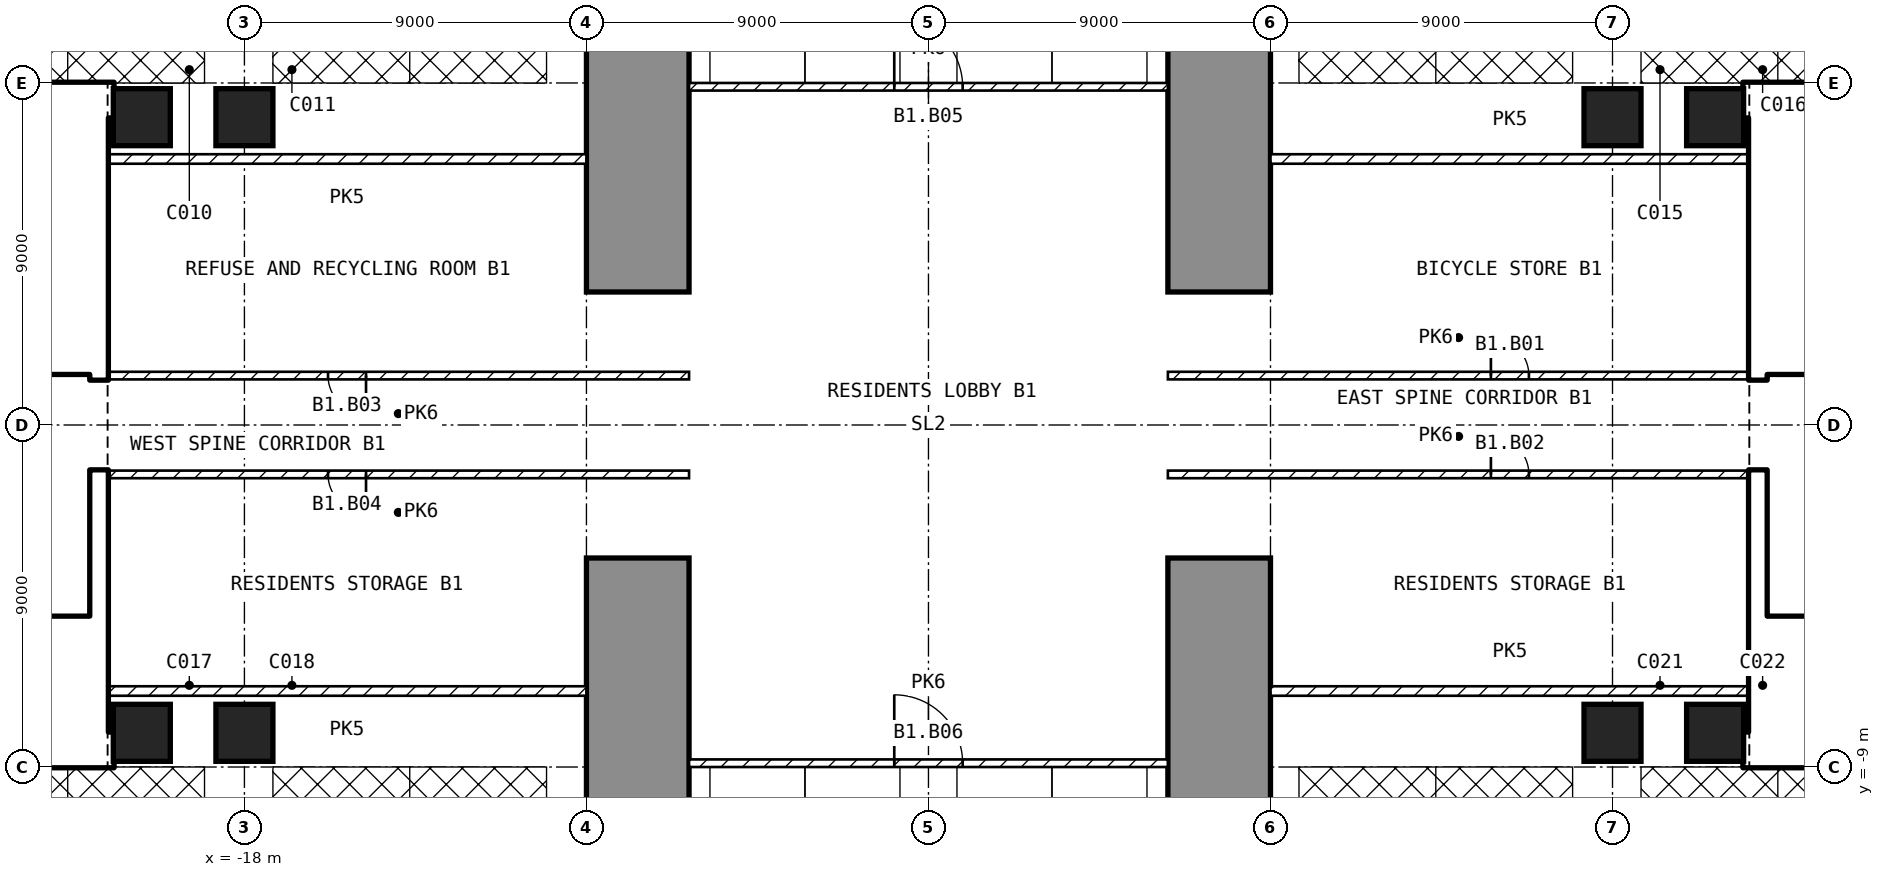
"""IFC4 building model, lengths in metres.
Left out: names, types, materials, properties, quantities, classifications, styles, units other than length and angle.
Written with IfcOpenShell. Run it as: python <this file> out.ifc"""

import sys

from ifc_helpers import new_model, si_unit, direction, frame, frame_2d, origin, origin_2d, place, context, subcontext, project, spatial, polyline, rectangle, outline, extrude, element, fill, save


model = new_model("IFC4")
c1 = context("Model", 3, precision=1e-05, world=origin(), true_north=direction((0.0, 1.0)))
c2 = subcontext(c1, "Body", "Model", "MODEL_VIEW")
j1 = project(units=[si_unit("LENGTHUNIT", "METRE"), si_unit("PLANEANGLEUNIT", "RADIAN")], contexts=[c1])
p1 = place(None, origin())
s1 = spatial("IfcSite", under=j1, at=p1, CompositionType="ELEMENT")
p2 = place(p1, origin())
s2 = spatial("IfcBuilding", under=s1, at=p2, CompositionType="ELEMENT")
p3 = place(p2, frame((0.0, 0.0, -4.5)))
s3 = spatial("IfcBuildingStorey", under=s2, at=p3, CompositionType="ELEMENT", Elevation=-4.5)
for number, where, z_axis, x_axis in (
    (1, (-20.7, -8.1, -0.3), (0.0, 0.0, 1.0), (1.0, 0.0, 0.0)),
    (2, (-20.7, 8.1, -0.3), (0.0, 0.0, 1.0), (1.0, 0.0, 0.0)),
    (3, (-18.0, -8.1, -0.3), (0.0, 0.0, 1.0), (1.0, 0.0, 0.0)),
    (4, (-18.0, 8.1, -0.3), (0.0, 0.0, 1.0), (1.0, 0.0, 0.0)),
    (5, (18.0, -8.1, -0.3), (0.0, 0.0, 1.0), (1.0, 0.0, 0.0)),
    (6, (18.0, 8.1, -0.3), (0.0, 0.0, 1.0), (1.0, 0.0, 0.0)),
    (7, (20.7, -8.1, -0.3), (0.0, 0.0, 1.0), (1.0, 0.0, 0.0)),
    (8, (20.7, 8.1, -0.3), (0.0, 0.0, 1.0), (1.0, 0.0, 0.0)),
):
    element("IfcColumn", number, at=place(p3, frame(where, z_axis=z_axis, x_axis=x_axis)), inside=s3, PredefinedType="COLUMN", context=c2, shape_type="SweptSolid", body=[
        extrude(rectangle(XDim=1.5, YDim=1.5, at=origin_2d()), origin(), (0.0, 0.0, 1.0), 4.4),
    ])
p4 = place(p3, frame((6.3, -27.0, -0.3), z_axis=(1.0, 0.0, 0.0), x_axis=(0.0, 1.0, 0.0)))
e9 = element("IfcWall", 9, at=p4, inside=s3, PredefinedType="SOLIDWALL", context=c2, shape_type="SweptSolid", body=[
    extrude(outline(polyline([(0.0, 0.0), (5.5, 0.0), (5.5, 3.3), (12.5, 3.3), (12.5, 0.0), (23.5, 0.0), (23.5, 4.4), (0.0, 4.4), (0.0, 0.0)])), origin(), (0.0, 0.0, 1.0), 2.7),
])
p5 = place(p3, frame((6.3, 3.5, -0.3), z_axis=(1.0, 0.0, 0.0), x_axis=(0.0, 1.0, 0.0)))
e10 = element("IfcWall", 10, at=p5, inside=s3, PredefinedType="SOLIDWALL", context=c2, shape_type="SweptSolid", body=[
    extrude(outline(polyline([(0.0, 0.0), (11.0, 0.0), (11.0, 3.3), (18.0, 3.3), (18.0, 0.0), (23.5, 0.0), (23.5, 4.4), (0.0, 4.4), (0.0, 0.0)])), origin(), (0.0, 0.0, 1.0), 2.7),
])
p6 = place(p3, frame((-9.0, -27.0, -0.3), z_axis=(1.0, 0.0, 0.0), x_axis=(0.0, 1.0, 0.0)))
e11 = element("IfcWall", 11, at=p6, inside=s3, PredefinedType="SOLIDWALL", context=c2, shape_type="SweptSolid", body=[
    extrude(outline(polyline([(0.0, 0.0), (5.5, 0.0), (5.5, 3.3), (12.5, 3.3), (12.5, 0.0), (23.5, 0.0), (23.5, 4.4), (0.0, 4.4), (0.0, 0.0)])), origin(), (0.0, 0.0, 1.0), 2.7),
])
p7 = place(p3, frame((-9.0, 3.5, -0.3), z_axis=(1.0, 0.0, 0.0), x_axis=(0.0, 1.0, 0.0)))
e12 = element("IfcWall", 12, at=p7, inside=s3, PredefinedType="SOLIDWALL", context=c2, shape_type="SweptSolid", body=[
    extrude(outline(polyline([(0.0, 0.0), (11.0, 0.0), (11.0, 3.3), (18.0, 3.3), (18.0, 0.0), (23.5, 0.0), (23.5, 4.4), (0.0, 4.4), (0.0, 0.0)])), origin(), (0.0, 0.0, 1.0), 2.7),
])
p8 = place(p3, frame((21.45, -8.55, 0.0), z_axis=(0.0, 0.0, 1.0), x_axis=(1.0, 0.0, 0.0)))
e13 = element("IfcWall", 13, at=p8, inside=s3, PredefinedType="SHEAR", context=c2, shape_type="SweptSolid", body=[
    extrude(rectangle(XDim=10.95, YDim=0.9, at=frame_2d((5.475, 0.0))), origin(), (0.0, 0.0, 1.0), 4.1),
])
p9 = place(p3, frame((21.45, 8.55, 0.0), z_axis=(0.0, 0.0, 1.0), x_axis=(1.0, 0.0, 0.0)))
e14 = element("IfcWall", 14, at=p9, inside=s3, PredefinedType="SHEAR", context=c2, shape_type="SweptSolid", body=[
    extrude(rectangle(XDim=10.05, YDim=0.9, at=frame_2d((5.025, 0.0))), origin(), (0.0, 0.0, 1.0), 4.1),
])
for number, where, z_axis, x_axis in (
    (15, (21.825, -8.1, 0.0), (0.0, 0.0, 1.0), (0.0, 1.0, 0.0)),
    (16, (21.825, 1.2, 0.0), (0.0, 0.0, 1.0), (0.0, 1.0, 0.0)),
):
    element("IfcWall", number, at=place(p3, frame(where, z_axis=z_axis, x_axis=x_axis)), inside=s3, PredefinedType="SHEAR", context=c2, shape_type="SweptSolid", body=[
        extrude(rectangle(XDim=6.9, YDim=0.45, at=frame_2d((3.45, 0.0))), origin(), (0.0, 0.0, 1.0), 4.1),
    ])
p10 = place(p3, frame((22.05, 1.45, 0.0), z_axis=(0.0, 0.0, 1.0), x_axis=(1.0, 0.0, 0.0)))
e17 = element("IfcWall", 17, at=p10, inside=s3, PredefinedType="SOLIDWALL", context=c2, shape_type="SweptSolid", body=[
    extrude(rectangle(XDim=13.05, YDim=0.2, at=frame_2d((6.525, 0.0))), origin(), (0.0, 0.0, 1.0), 4.1),
])
p11 = place(p10, frame((0.75, 0.0, 0.0)))
e18 = element("IfcOpeningElement", 18, at=p11, cuts=e17, PredefinedType="OPENING", context=c2, shape_type="SweptSolid", body=[
    extrude(rectangle(XDim=1.0, YDim=2.1, at=frame_2d((0.5, 1.05))), frame((0.0, 0.11, 0.0), z_axis=(0.0, -1.0, 0.0), x_axis=(1.0, 0.0, 0.0)), (0.0, 0.0, 1.0), 0.22),
])
p12 = place(p10, frame((3.25, 0.0, 0.0)))
e19 = element("IfcOpeningElement", 19, at=p12, cuts=e17, PredefinedType="OPENING", context=c2, shape_type="SweptSolid", body=[
    extrude(rectangle(XDim=1.0, YDim=2.1, at=frame_2d((0.5, 1.05))), frame((0.0, 0.11, 0.0), z_axis=(0.0, -1.0, 0.0), x_axis=(1.0, 0.0, 0.0)), (0.0, 0.0, 1.0), 0.22),
])
p13 = place(p3, frame((22.05, 5.15, 0.0), z_axis=(0.0, 0.0, 1.0), x_axis=(1.0, 0.0, 0.0)))
e20 = element("IfcWall", 20, at=p13, inside=s3, PredefinedType="SOLIDWALL", context=c2, shape_type="SweptSolid", body=[
    extrude(rectangle(XDim=6.3, YDim=0.2, at=frame_2d((3.15, 0.0))), origin(), (0.0, 0.0, 1.0), 4.1),
])
p14 = place(p13, frame((0.2, 0.0, 0.0)))
e21 = element("IfcOpeningElement", 21, at=p14, cuts=e20, PredefinedType="OPENING", context=c2, shape_type="SweptSolid", body=[
    extrude(rectangle(XDim=1.0, YDim=2.1, at=frame_2d((0.5, 1.05))), frame((0.0, 0.11, 0.0), z_axis=(0.0, -1.0, 0.0), x_axis=(1.0, 0.0, 0.0)), (0.0, 0.0, 1.0), 0.22),
])
p15 = place(p3, frame((22.05, -5.15, 0.0), z_axis=(0.0, 0.0, 1.0), x_axis=(1.0, 0.0, 0.0)))
e22 = element("IfcWall", 22, at=p15, inside=s3, PredefinedType="SOLIDWALL", context=c2, shape_type="SweptSolid", body=[
    extrude(rectangle(XDim=6.3, YDim=0.2, at=frame_2d((3.15, 0.0))), origin(), (0.0, 0.0, 1.0), 4.1),
])
p16 = place(p15, frame((0.2, 0.0, 0.0)))
e23 = element("IfcOpeningElement", 23, at=p16, cuts=e22, PredefinedType="OPENING", context=c2, shape_type="SweptSolid", body=[
    extrude(rectangle(XDim=1.0, YDim=2.1, at=frame_2d((0.5, 1.05))), frame((0.0, 0.11, 0.0), z_axis=(0.0, -1.0, 0.0), x_axis=(1.0, 0.0, 0.0)), (0.0, 0.0, 1.0), 0.22),
])
p17 = place(p3, frame((-32.4, -8.55, 0.0), z_axis=(0.0, 0.0, 1.0), x_axis=(1.0, 0.0, 0.0)))
e24 = element("IfcWall", 24, at=p17, inside=s3, PredefinedType="SHEAR", context=c2, shape_type="SweptSolid", body=[
    extrude(rectangle(XDim=10.95, YDim=0.9, at=frame_2d((5.475, 0.0))), origin(), (0.0, 0.0, 1.0), 4.1),
])
p18 = place(p3, frame((-31.5, 8.55, 0.0), z_axis=(0.0, 0.0, 1.0), x_axis=(1.0, 0.0, 0.0)))
e25 = element("IfcWall", 25, at=p18, inside=s3, PredefinedType="SHEAR", context=c2, shape_type="SweptSolid", body=[
    extrude(rectangle(XDim=10.05, YDim=0.9, at=frame_2d((5.025, 0.0))), origin(), (0.0, 0.0, 1.0), 4.1),
])
for number, where, z_axis, x_axis in (
    (26, (-21.825, -8.1, 0.0), (0.0, 0.0, 1.0), (0.0, 1.0, 0.0)),
    (27, (-21.825, 1.2, 0.0), (0.0, 0.0, 1.0), (0.0, 1.0, 0.0)),
):
    element("IfcWall", number, at=place(p3, frame(where, z_axis=z_axis, x_axis=x_axis)), inside=s3, PredefinedType="SHEAR", context=c2, shape_type="SweptSolid", body=[
        extrude(rectangle(XDim=6.9, YDim=0.45, at=frame_2d((3.45, 0.0))), origin(), (0.0, 0.0, 1.0), 4.1),
    ])
p19 = place(p3, frame((-35.1, 1.45, 0.0), z_axis=(0.0, 0.0, 1.0), x_axis=(1.0, 0.0, 0.0)))
e28 = element("IfcWall", 28, at=p19, inside=s3, PredefinedType="SOLIDWALL", context=c2, shape_type="SweptSolid", body=[
    extrude(rectangle(XDim=13.05, YDim=0.2, at=frame_2d((6.525, 0.0))), origin(), (0.0, 0.0, 1.0), 4.1),
])
p20 = place(p19, frame((11.3, 0.0, 0.0)))
e29 = element("IfcOpeningElement", 29, at=p20, cuts=e28, PredefinedType="OPENING", context=c2, shape_type="SweptSolid", body=[
    extrude(rectangle(XDim=1.0, YDim=2.1, at=frame_2d((0.5, 1.05))), frame((0.0, 0.11, 0.0), z_axis=(0.0, -1.0, 0.0), x_axis=(1.0, 0.0, 0.0)), (0.0, 0.0, 1.0), 0.22),
])
p21 = place(p19, frame((8.8, 0.0, 0.0)))
e30 = element("IfcOpeningElement", 30, at=p21, cuts=e28, PredefinedType="OPENING", context=c2, shape_type="SweptSolid", body=[
    extrude(rectangle(XDim=1.0, YDim=2.1, at=frame_2d((0.5, 1.05))), frame((0.0, 0.11, 0.0), z_axis=(0.0, -1.0, 0.0), x_axis=(1.0, 0.0, 0.0)), (0.0, 0.0, 1.0), 0.22),
])
p22 = place(p3, frame((-28.35, 5.15, 0.0), z_axis=(0.0, 0.0, 1.0), x_axis=(1.0, 0.0, 0.0)))
e31 = element("IfcWall", 31, at=p22, inside=s3, PredefinedType="SOLIDWALL", context=c2, shape_type="SweptSolid", body=[
    extrude(rectangle(XDim=6.3, YDim=0.2, at=frame_2d((3.15, 0.0))), origin(), (0.0, 0.0, 1.0), 4.1),
])
p23 = place(p22, frame((5.1, 0.0, 0.0)))
e32 = element("IfcOpeningElement", 32, at=p23, cuts=e31, PredefinedType="OPENING", context=c2, shape_type="SweptSolid", body=[
    extrude(rectangle(XDim=1.0, YDim=2.1, at=frame_2d((0.5, 1.05))), frame((0.0, 0.11, 0.0), z_axis=(0.0, -1.0, 0.0), x_axis=(1.0, 0.0, 0.0)), (0.0, 0.0, 1.0), 0.22),
])
p24 = place(p3, frame((-28.35, -5.15, 0.0), z_axis=(0.0, 0.0, 1.0), x_axis=(1.0, 0.0, 0.0)))
e33 = element("IfcWall", 33, at=p24, inside=s3, PredefinedType="SOLIDWALL", context=c2, shape_type="SweptSolid", body=[
    extrude(rectangle(XDim=6.3, YDim=0.2, at=frame_2d((3.15, 0.0))), origin(), (0.0, 0.0, 1.0), 4.1),
])
p25 = place(p24, frame((5.1, 0.0, 0.0)))
e34 = element("IfcOpeningElement", 34, at=p25, cuts=e33, PredefinedType="OPENING", context=c2, shape_type="SweptSolid", body=[
    extrude(rectangle(XDim=1.0, YDim=2.1, at=frame_2d((0.5, 1.05))), frame((0.0, 0.11, 0.0), z_axis=(0.0, -1.0, 0.0), x_axis=(1.0, 0.0, 0.0)), (0.0, 0.0, 1.0), 0.22),
])
p26 = place(p3, frame((6.3, 1.3, 0.0), z_axis=(0.0, 0.0, 1.0), x_axis=(1.0, 0.0, 0.0)))
e35 = element("IfcWall", 35, at=p26, inside=s3, PredefinedType="PARTITIONING", context=c2, shape_type="SweptSolid", body=[
    extrude(rectangle(XDim=15.3, YDim=0.2, at=frame_2d((7.65, 0.0))), origin(), (0.0, 0.0, 1.0), 4.1),
])
p27 = place(p26, frame((8.5, 0.0, 0.0)))
e36 = element("IfcOpeningElement", 36, at=p27, cuts=e35, PredefinedType="OPENING", context=c2, shape_type="SweptSolid", body=[
    extrude(rectangle(XDim=1.0, YDim=2.1, at=frame_2d((0.5, 1.05))), frame((0.0, 0.11, 0.0), z_axis=(0.0, -1.0, 0.0), x_axis=(1.0, 0.0, 0.0)), (0.0, 0.0, 1.0), 0.22),
])
p28 = place(p3, frame((9.0, 7.0, 0.0), z_axis=(0.0, 0.0, 1.0), x_axis=(1.0, 0.0, 0.0)))
e37 = element("IfcWall", 37, at=p28, inside=s3, PredefinedType="SOLIDWALL", context=c2, shape_type="SweptSolid", body=[
    extrude(rectangle(XDim=12.6, YDim=0.25, at=frame_2d((6.3, 0.0))), origin(), (0.0, 0.0, 1.0), 4.1),
])
p29 = place(p3, frame((6.3, -1.3, 0.0), z_axis=(0.0, 0.0, 1.0), x_axis=(1.0, 0.0, 0.0)))
e38 = element("IfcWall", 38, at=p29, inside=s3, PredefinedType="PARTITIONING", context=c2, shape_type="SweptSolid", body=[
    extrude(rectangle(XDim=15.3, YDim=0.2, at=frame_2d((7.65, 0.0))), origin(), (0.0, 0.0, 1.0), 4.1),
])
p30 = place(p29, frame((8.5, 0.0, 0.0)))
e39 = element("IfcOpeningElement", 39, at=p30, cuts=e38, PredefinedType="OPENING", context=c2, shape_type="SweptSolid", body=[
    extrude(rectangle(XDim=1.0, YDim=2.1, at=frame_2d((0.5, 1.05))), frame((0.0, 0.11, 0.0), z_axis=(0.0, -1.0, 0.0), x_axis=(1.0, 0.0, 0.0)), (0.0, 0.0, 1.0), 0.22),
])
p31 = place(p3, frame((9.0, -7.0, 0.0), z_axis=(0.0, 0.0, 1.0), x_axis=(1.0, 0.0, 0.0)))
e40 = element("IfcWall", 40, at=p31, inside=s3, PredefinedType="SOLIDWALL", context=c2, shape_type="SweptSolid", body=[
    extrude(rectangle(XDim=12.6, YDim=0.25, at=frame_2d((6.3, 0.0))), origin(), (0.0, 0.0, 1.0), 4.1),
])
p32 = place(p3, frame((-6.3, 1.3, 0.0), z_axis=(0.0, 0.0, 1.0), x_axis=(-1.0, 0.0, 0.0)))
e41 = element("IfcWall", 41, at=p32, inside=s3, PredefinedType="PARTITIONING", context=c2, shape_type="SweptSolid", body=[
    extrude(rectangle(XDim=15.3, YDim=0.2, at=frame_2d((7.65, 0.0))), origin(), (0.0, 0.0, 1.0), 4.1),
])
p33 = place(p32, frame((8.5, 0.0, 0.0)))
e42 = element("IfcOpeningElement", 42, at=p33, cuts=e41, PredefinedType="OPENING", context=c2, shape_type="SweptSolid", body=[
    extrude(rectangle(XDim=1.0, YDim=2.1, at=frame_2d((0.5, 1.05))), frame((0.0, 0.11, 0.0), z_axis=(0.0, -1.0, 0.0), x_axis=(1.0, 0.0, 0.0)), (0.0, 0.0, 1.0), 0.22),
])
p34 = place(p3, frame((-9.0, 7.0, 0.0), z_axis=(0.0, 0.0, 1.0), x_axis=(-1.0, 0.0, 0.0)))
e43 = element("IfcWall", 43, at=p34, inside=s3, PredefinedType="SOLIDWALL", context=c2, shape_type="SweptSolid", body=[
    extrude(rectangle(XDim=12.6, YDim=0.25, at=frame_2d((6.3, 0.0))), origin(), (0.0, 0.0, 1.0), 4.1),
])
p35 = place(p3, frame((-6.3, -1.3, 0.0), z_axis=(0.0, 0.0, 1.0), x_axis=(-1.0, 0.0, 0.0)))
e44 = element("IfcWall", 44, at=p35, inside=s3, PredefinedType="PARTITIONING", context=c2, shape_type="SweptSolid", body=[
    extrude(rectangle(XDim=15.3, YDim=0.2, at=frame_2d((7.65, 0.0))), origin(), (0.0, 0.0, 1.0), 4.1),
])
p36 = place(p35, frame((8.5, 0.0, 0.0)))
e45 = element("IfcOpeningElement", 45, at=p36, cuts=e44, PredefinedType="OPENING", context=c2, shape_type="SweptSolid", body=[
    extrude(rectangle(XDim=1.0, YDim=2.1, at=frame_2d((0.5, 1.05))), frame((0.0, 0.11, 0.0), z_axis=(0.0, -1.0, 0.0), x_axis=(1.0, 0.0, 0.0)), (0.0, 0.0, 1.0), 0.22),
])
p37 = place(p3, frame((-9.0, -7.0, 0.0), z_axis=(0.0, 0.0, 1.0), x_axis=(-1.0, 0.0, 0.0)))
e46 = element("IfcWall", 46, at=p37, inside=s3, PredefinedType="SOLIDWALL", context=c2, shape_type="SweptSolid", body=[
    extrude(rectangle(XDim=12.6, YDim=0.25, at=frame_2d((6.3, 0.0))), origin(), (0.0, 0.0, 1.0), 4.1),
])
p38 = place(p3, frame((-6.3, 8.9, 0.0), z_axis=(0.0, 0.0, 1.0), x_axis=(1.0, 0.0, 0.0)))
e47 = element("IfcWall", 47, at=p38, inside=s3, PredefinedType="PARTITIONING", context=c2, shape_type="SweptSolid", body=[
    extrude(rectangle(XDim=12.6, YDim=0.2, at=frame_2d((6.3, 0.0))), origin(), (0.0, 0.0, 1.0), 4.1),
])
p39 = place(p38, frame((5.4, 0.0, 0.0)))
e48 = element("IfcOpeningElement", 48, at=p39, cuts=e47, PredefinedType="OPENING", context=c2, shape_type="SweptSolid", body=[
    extrude(rectangle(XDim=1.8, YDim=2.1, at=frame_2d((0.9, 1.05))), frame((0.0, 0.11, 0.0), z_axis=(0.0, -1.0, 0.0), x_axis=(1.0, 0.0, 0.0)), (0.0, 0.0, 1.0), 0.22),
])
p40 = place(p3, frame((-6.3, -8.9, 0.0), z_axis=(0.0, 0.0, 1.0), x_axis=(1.0, 0.0, 0.0)))
e49 = element("IfcWall", 49, at=p40, inside=s3, PredefinedType="PARTITIONING", context=c2, shape_type="SweptSolid", body=[
    extrude(rectangle(XDim=12.6, YDim=0.2, at=frame_2d((6.3, 0.0))), origin(), (0.0, 0.0, 1.0), 4.1),
])
p41 = place(p40, frame((5.4, 0.0, 0.0)))
e50 = element("IfcOpeningElement", 50, at=p41, cuts=e49, PredefinedType="OPENING", context=c2, shape_type="SweptSolid", body=[
    extrude(rectangle(XDim=1.8, YDim=2.1, at=frame_2d((0.9, 1.05))), frame((0.0, 0.11, 0.0), z_axis=(0.0, -1.0, 0.0), x_axis=(1.0, 0.0, 0.0)), (0.0, 0.0, 1.0), 0.22),
])
p42 = place(p16, origin())
e51 = element("IfcDoor", 51, at=p42, inside=s3, OperationType="SINGLE_SWING_LEFT", PredefinedType="DOOR", context=c2, shape_type="SweptSolid", body=[
    extrude(rectangle(XDim=1.0, YDim=2.1, at=frame_2d((0.5, 1.05))), frame((0.0, 0.025, 0.0), z_axis=(0.0, -1.0, 0.0), x_axis=(1.0, 0.0, 0.0)), (0.0, 0.0, 1.0), 0.05),
])
fill(e23, e51)
p43 = place(p14, origin())
e52 = element("IfcDoor", 52, at=p43, inside=s3, OperationType="SINGLE_SWING_LEFT", PredefinedType="DOOR", context=c2, shape_type="SweptSolid", body=[
    extrude(rectangle(XDim=1.0, YDim=2.1, at=frame_2d((0.5, 1.05))), frame((0.0, 0.025, 0.0), z_axis=(0.0, -1.0, 0.0), x_axis=(1.0, 0.0, 0.0)), (0.0, 0.0, 1.0), 0.05),
])
fill(e21, e52)
p44 = place(p11, origin())
e53 = element("IfcDoor", 53, at=p44, inside=s3, OperationType="SINGLE_SWING_LEFT", PredefinedType="DOOR", context=c2, shape_type="SweptSolid", body=[
    extrude(rectangle(XDim=1.0, YDim=2.1, at=frame_2d((0.5, 1.05))), frame((0.0, 0.025, 0.0), z_axis=(0.0, -1.0, 0.0), x_axis=(1.0, 0.0, 0.0)), (0.0, 0.0, 1.0), 0.05),
])
fill(e18, e53)
p45 = place(p25, origin())
e54 = element("IfcDoor", 54, at=p45, inside=s3, OperationType="SINGLE_SWING_LEFT", PredefinedType="DOOR", context=c2, shape_type="SweptSolid", body=[
    extrude(rectangle(XDim=1.0, YDim=2.1, at=frame_2d((0.5, 1.05))), frame((0.0, 0.025, 0.0), z_axis=(0.0, -1.0, 0.0), x_axis=(1.0, 0.0, 0.0)), (0.0, 0.0, 1.0), 0.05),
])
fill(e34, e54)
p46 = place(p23, origin())
e55 = element("IfcDoor", 55, at=p46, inside=s3, OperationType="SINGLE_SWING_LEFT", PredefinedType="DOOR", context=c2, shape_type="SweptSolid", body=[
    extrude(rectangle(XDim=1.0, YDim=2.1, at=frame_2d((0.5, 1.05))), frame((0.0, 0.025, 0.0), z_axis=(0.0, -1.0, 0.0), x_axis=(1.0, 0.0, 0.0)), (0.0, 0.0, 1.0), 0.05),
])
fill(e32, e55)
p47 = place(p20, origin())
e56 = element("IfcDoor", 56, at=p47, inside=s3, OperationType="SINGLE_SWING_LEFT", PredefinedType="DOOR", context=c2, shape_type="SweptSolid", body=[
    extrude(rectangle(XDim=1.0, YDim=2.1, at=frame_2d((0.5, 1.05))), frame((0.0, 0.025, 0.0), z_axis=(0.0, -1.0, 0.0), x_axis=(1.0, 0.0, 0.0)), (0.0, 0.0, 1.0), 0.05),
])
fill(e29, e56)
p48 = place(p27, origin())
e57 = element("IfcDoor", 57, at=p48, inside=s3, OperationType="SINGLE_SWING_LEFT", PredefinedType="DOOR", context=c2, shape_type="SweptSolid", body=[
    extrude(rectangle(XDim=1.0, YDim=2.1, at=frame_2d((0.5, 1.05))), frame((0.0, 0.025, 0.0), z_axis=(0.0, -1.0, 0.0), x_axis=(1.0, 0.0, 0.0)), (0.0, 0.0, 1.0), 0.05),
])
fill(e36, e57)
p49 = place(p30, origin())
e58 = element("IfcDoor", 58, at=p49, inside=s3, OperationType="SINGLE_SWING_LEFT", PredefinedType="DOOR", context=c2, shape_type="SweptSolid", body=[
    extrude(rectangle(XDim=1.0, YDim=2.1, at=frame_2d((0.5, 1.05))), frame((0.0, 0.025, 0.0), z_axis=(0.0, -1.0, 0.0), x_axis=(1.0, 0.0, 0.0)), (0.0, 0.0, 1.0), 0.05),
])
fill(e39, e58)
p50 = place(p33, origin())
e59 = element("IfcDoor", 59, at=p50, inside=s3, OperationType="SINGLE_SWING_LEFT", PredefinedType="DOOR", context=c2, shape_type="SweptSolid", body=[
    extrude(rectangle(XDim=1.0, YDim=2.1, at=frame_2d((0.5, 1.05))), frame((0.0, 0.025, 0.0), z_axis=(0.0, -1.0, 0.0), x_axis=(1.0, 0.0, 0.0)), (0.0, 0.0, 1.0), 0.05),
])
fill(e42, e59)
p51 = place(p36, origin())
e60 = element("IfcDoor", 60, at=p51, inside=s3, OperationType="SINGLE_SWING_LEFT", PredefinedType="DOOR", context=c2, shape_type="SweptSolid", body=[
    extrude(rectangle(XDim=1.0, YDim=2.1, at=frame_2d((0.5, 1.05))), frame((0.0, 0.025, 0.0), z_axis=(0.0, -1.0, 0.0), x_axis=(1.0, 0.0, 0.0)), (0.0, 0.0, 1.0), 0.05),
])
fill(e45, e60)
p52 = place(p39, origin())
e61 = element("IfcDoor", 61, at=p52, inside=s3, OperationType="SINGLE_SWING_LEFT", PredefinedType="DOOR", context=c2, shape_type="SweptSolid", body=[
    extrude(rectangle(XDim=1.8, YDim=2.1, at=frame_2d((0.9, 1.05))), frame((0.0, 0.025, 0.0), z_axis=(0.0, -1.0, 0.0), x_axis=(1.0, 0.0, 0.0)), (0.0, 0.0, 1.0), 0.05),
])
fill(e48, e61)
p53 = place(p41, origin())
e62 = element("IfcDoor", 62, at=p53, inside=s3, OperationType="SINGLE_SWING_LEFT", PredefinedType="DOOR", context=c2, shape_type="SweptSolid", body=[
    extrude(rectangle(XDim=1.8, YDim=2.1, at=frame_2d((0.9, 1.05))), frame((0.0, 0.025, 0.0), z_axis=(0.0, -1.0, 0.0), x_axis=(1.0, 0.0, 0.0)), (0.0, 0.0, 1.0), 0.05),
])
fill(e50, e62)
save(model, sys.argv[1])
